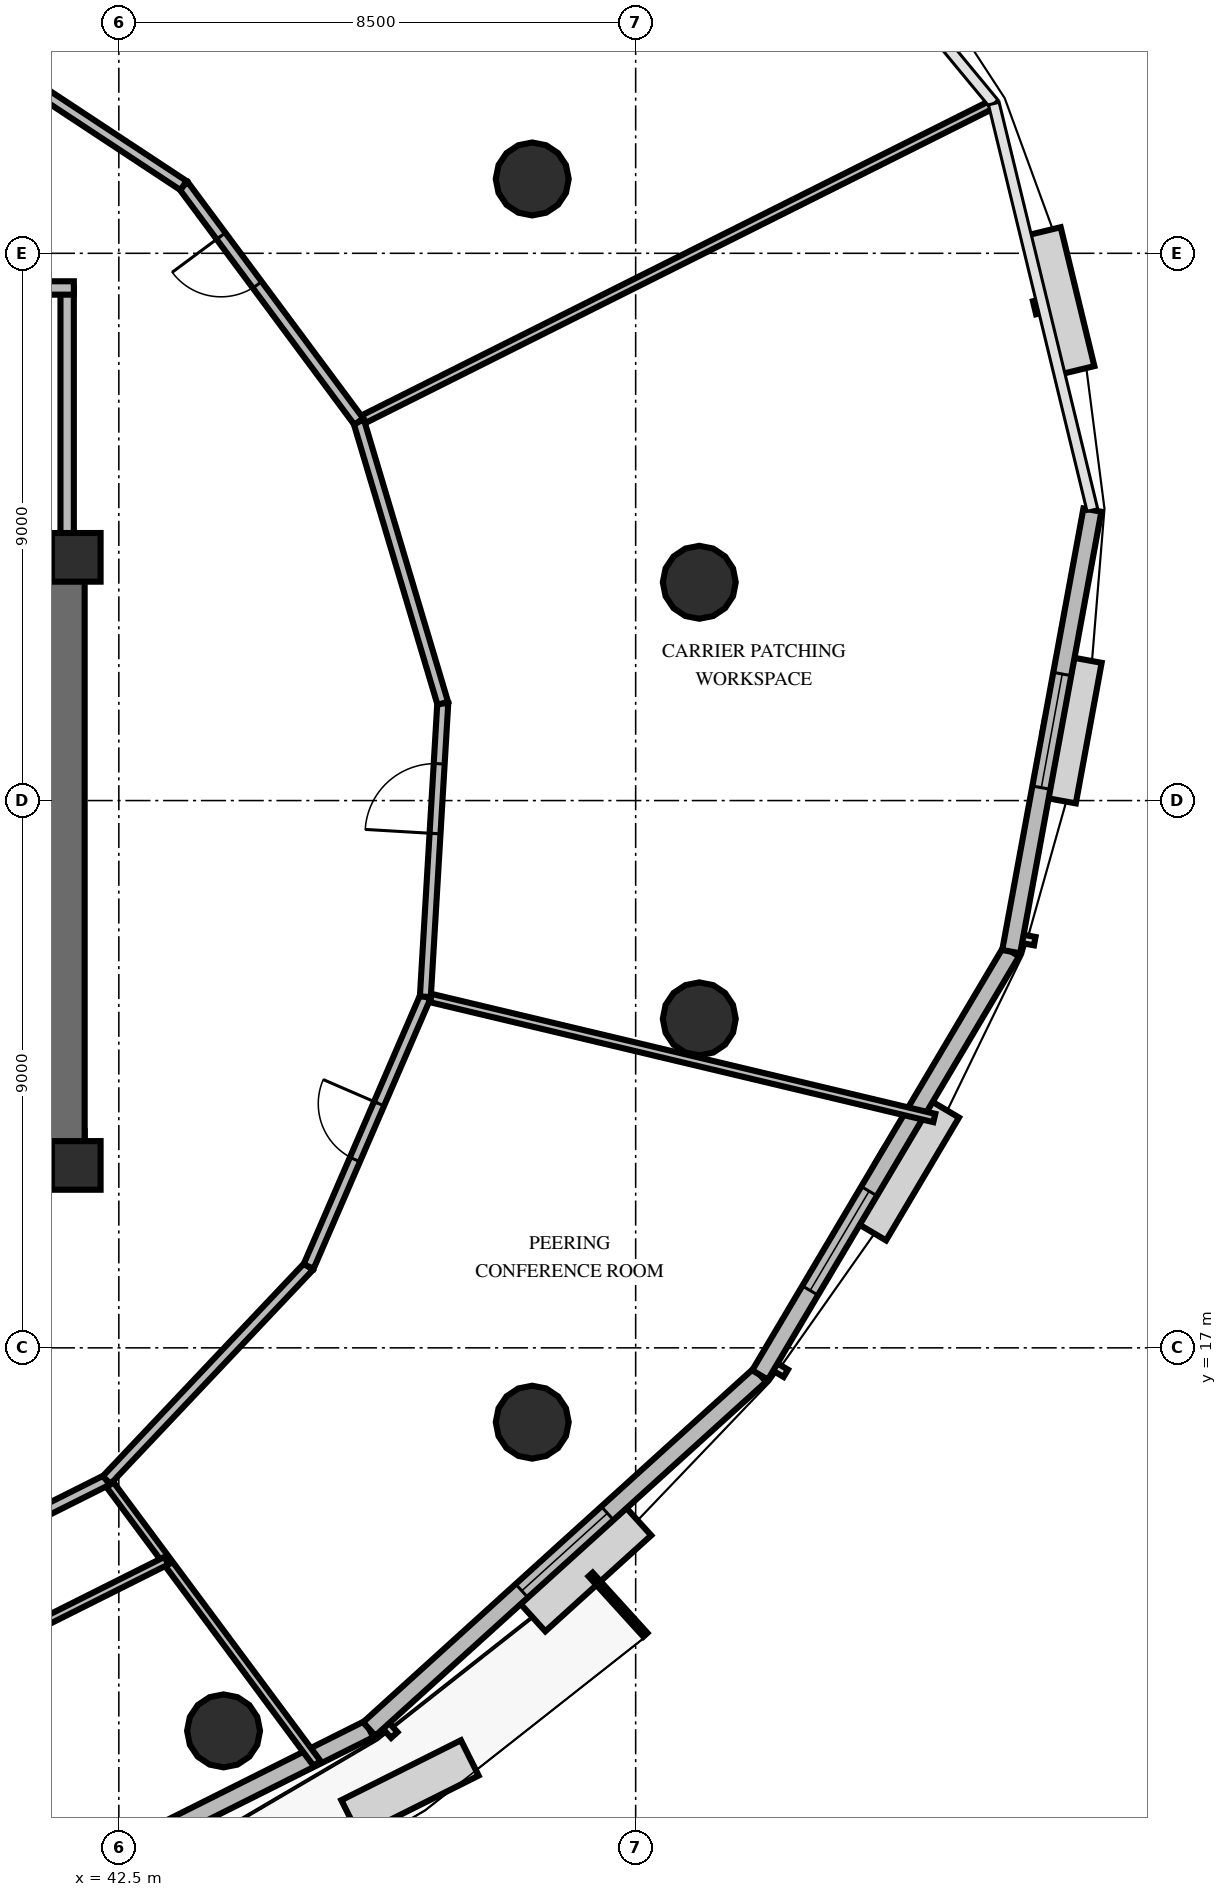
"""IFC4 building model, lengths in metres.
Left out: names, types, materials, properties, quantities, classifications, styles, units other than length and angle.
Written with IfcOpenShell. Run it as: python <this file> out.ifc"""

import sys

from ifc_helpers import new_model, si_unit, direction, frame, frame_2d, origin, origin_2d, place, context, subcontext, project, spatial, rectangle, circle, extrude, element, fill, save


model = new_model("IFC4")
c1 = context("Model", 3, precision=1e-05, world=origin(), true_north=direction((0.0, 1.0)))
c2 = subcontext(c1, "Body", "Model", "MODEL_VIEW")
j1 = project(units=[si_unit("LENGTHUNIT", "METRE"), si_unit("PLANEANGLEUNIT", "RADIAN")], contexts=[c1])
p1 = place(None, origin())
s1 = spatial("IfcSite", under=j1, at=p1, CompositionType="ELEMENT")
p2 = place(p1, origin())
s2 = spatial("IfcBuilding", under=s1, at=p2, CompositionType="ELEMENT")
p3 = place(p2, frame((0.0, 0.0, 145.8)))
s3 = spatial("IfcBuildingStorey", under=s2, at=p3, CompositionType="ELEMENT", Elevation=145.8)
p4 = place(p3, frame((26.072, 20.187, 0.0), z_axis=(0.0, 0.0, 1.0), x_axis=(1.0, 0.0, 0.0)))
e1 = element("IfcWall", 1, at=p4, inside=s3, PredefinedType="SHEAR", context=c2, shape_type="SweptSolid", body=[
    extrude(rectangle(XDim=15.866, YDim=0.75, at=frame_2d((7.933, 0.0))), origin(), (0.0, 0.0, 1.0), 4.0),
])
p5 = place(p3, frame((26.072, 30.013, 0.0), z_axis=(0.0, 0.0, 1.0), x_axis=(1.0, 0.0, 0.0)))
e2 = element("IfcWall", 2, at=p5, inside=s3, PredefinedType="SHEAR", context=c2, shape_type="SweptSolid", body=[
    extrude(rectangle(XDim=15.866, YDim=0.75, at=frame_2d((7.933, 0.0))), origin(), (0.0, 0.0, 1.0), 4.0),
])
p6 = place(p5, frame((0.878, 0.0, 0.0)))
e3 = element("IfcOpeningElement", 3, at=p6, cuts=e2, PredefinedType="OPENING", context=c2, shape_type="SweptSolid", body=[
    extrude(rectangle(XDim=1.05, YDim=2.15, at=frame_2d((0.525, 1.075))), frame((0.0, 0.385, 0.0), z_axis=(0.0, -1.0, 0.0), x_axis=(1.0, 0.0, 0.0)), (0.0, 0.0, 1.0), 0.77),
])
p7 = place(p5, frame((13.928, 0.0, 0.0)))
e4 = element("IfcOpeningElement", 4, at=p7, cuts=e2, PredefinedType="OPENING", context=c2, shape_type="SweptSolid", body=[
    extrude(rectangle(XDim=1.05, YDim=2.15, at=frame_2d((0.525, 1.075))), frame((0.0, 0.385, 0.0), z_axis=(0.0, -1.0, 0.0), x_axis=(1.0, 0.0, 0.0)), (0.0, 0.0, 1.0), 0.77),
])
p8 = place(p5, frame((7.378, 0.0, 0.0)))
e5 = element("IfcOpeningElement", 5, at=p8, cuts=e2, PredefinedType="OPENING", context=c2, shape_type="SweptSolid", body=[
    extrude(rectangle(XDim=1.1, YDim=2.15, at=frame_2d((0.55, 1.075))), frame((0.0, 0.385, 0.0), z_axis=(0.0, -1.0, 0.0), x_axis=(1.0, 0.0, 0.0)), (0.0, 0.0, 1.0), 0.77),
])
p9 = place(p3, frame((41.563, 19.812, 0.0), z_axis=(0.0, 0.0, 1.0), x_axis=(0.0, 1.0, 0.0)))
e6 = element("IfcWall", 6, at=p9, inside=s3, PredefinedType="SHEAR", context=c2, shape_type="SweptSolid", body=[
    extrude(rectangle(XDim=10.576, YDim=0.75, at=frame_2d((5.288, 0.0))), origin(), (0.0, 0.0, 1.0), 4.0),
])
for number, where, z_axis, x_axis in (
    (7, (41.8, 20.0, 0.0), (0.0, 0.0, 1.0), (1.0, 0.0, 0.0)),
    (8, (41.8, 30.0, 0.0), (0.0, 0.0, 1.0), (1.0, 0.0, 0.0)),
):
    element("IfcColumn", number, at=place(p3, frame(where, z_axis=z_axis, x_axis=x_axis)), inside=s3, PredefinedType="PILASTER", context=c2, shape_type="SweptSolid", body=[
        extrude(rectangle(XDim=0.8, YDim=0.8, at=origin_2d()), origin(), (0.0, 0.0, 1.0), 4.0),
    ])
for number, where, z_axis, x_axis in (
    (9, (52.046, 29.59, 0.0), (0.0, 0.0, 1.0), (1.0, 0.0, 0.0)),
    (10, (49.299, 36.222, 0.0), (0.0, 0.0, 1.0), (1.0, 0.0, 0.0)),
    (11, (44.222, 10.701, 0.0), (0.0, 0.0, 1.0), (1.0, 0.0, 0.0)),
    (12, (49.299, 15.778, 0.0), (0.0, 0.0, 1.0), (1.0, 0.0, 0.0)),
    (13, (52.046, 22.41, 0.0), (0.0, 0.0, 1.0), (1.0, 0.0, 0.0)),
):
    element("IfcColumn", number, at=place(p3, frame(where, z_axis=z_axis, x_axis=x_axis)), inside=s3, PredefinedType="COLUMN", context=c2, shape_type="SweptSolid", body=[
        extrude(circle(Radius=0.6, at=origin_2d()), origin(), (0.0, 0.0, 1.0), 4.0),
    ])
p10 = place(p3, frame((38.668, 6.75, 0.0), z_axis=(0.0, 0.0, 1.0), x_axis=(0.894163416392, 0.447740756227, 0.0)))
e14 = element("IfcWall", 14, at=p10, inside=s3, PredefinedType="SOLIDWALL", context=c2, shape_type="SweptSolid", body=[
    extrude(rectangle(XDim=8.891, YDim=0.3, at=frame_2d((4.445, 0.0))), origin(), (0.0, 0.0, 1.0), 2.9),
])
p11 = place(p10, frame((2.51, 0.0, 0.0)))
e15 = element("IfcOpeningElement", 15, at=p11, cuts=e14, PredefinedType="OPENING", context=c2, shape_type="SweptSolid", body=[
    extrude(rectangle(XDim=1.05, YDim=2.15, at=frame_2d((0.525, 1.075))), frame((0.0, 0.16, 0.0), z_axis=(0.0, -1.0, 0.0), x_axis=(1.0, 0.0, 0.0)), (0.0, 0.0, 1.0), 0.32),
])
p12 = place(p3, frame((46.618, 10.731, 0.0), z_axis=(0.0, 0.0, 1.0), x_axis=(0.741123503334, 0.671368715987, 0.0)))
e16 = element("IfcWall", 16, at=p12, inside=s3, PredefinedType="SOLIDWALL", context=c2, shape_type="SweptSolid", body=[
    extrude(rectangle(XDim=8.673, YDim=0.3, at=frame_2d((4.336, 0.0))), origin(), (0.0, 0.0, 1.0), 2.9),
])
p13 = place(p12, frame((3.386, 0.0, 0.8)))
e17 = element("IfcOpeningElement", 17, at=p13, cuts=e16, PredefinedType="OPENING", context=c2, shape_type="SweptSolid", body=[
    extrude(rectangle(XDim=1.9, YDim=1.95, at=frame_2d((0.95, 0.975))), frame((0.0, 0.16, 0.0), z_axis=(0.0, -1.0, 0.0), x_axis=(1.0, 0.0, 0.0)), (0.0, 0.0, 1.0), 0.32),
])
p14 = place(p3, frame((53.045, 16.554, 0.0), z_axis=(0.0, 0.0, 1.0), x_axis=(0.510285094065, 0.860005303922, 0.0)))
e18 = element("IfcWall", 18, at=p14, inside=s3, PredefinedType="SOLIDWALL", context=c2, shape_type="SweptSolid", body=[
    extrude(rectangle(XDim=8.095, YDim=0.3, at=frame_2d((4.048, 0.0))), origin(), (0.0, 0.0, 1.0), 2.9),
])
p15 = place(p14, frame((1.615, 0.0, 0.8)))
e19 = element("IfcOpeningElement", 19, at=p15, cuts=e18, PredefinedType="OPENING", context=c2, shape_type="SweptSolid", body=[
    extrude(rectangle(XDim=1.9, YDim=1.95, at=frame_2d((0.95, 0.975))), frame((0.0, 0.16, 0.0), z_axis=(0.0, -1.0, 0.0), x_axis=(1.0, 0.0, 0.0)), (0.0, 0.0, 1.0), 0.32),
])
p16 = place(p3, frame((57.176, 23.516, 0.0), z_axis=(0.0, 0.0, 1.0), x_axis=(0.180843444068, 0.983511895575, 0.0)))
e20 = element("IfcWall", 20, at=p16, inside=s3, PredefinedType="SOLIDWALL", context=c2, shape_type="SweptSolid", body=[
    extrude(rectangle(XDim=7.383, YDim=0.3, at=frame_2d((3.692, 0.0))), origin(), (0.0, 0.0, 1.0), 2.9),
])
p17 = place(p16, frame((2.742, 0.0, 0.8)))
e21 = element("IfcOpeningElement", 21, at=p17, cuts=e20, PredefinedType="OPENING", context=c2, shape_type="SweptSolid", body=[
    extrude(rectangle(XDim=1.9, YDim=1.95, at=frame_2d((0.95, 0.975))), frame((0.0, 0.16, 0.0), z_axis=(0.0, -1.0, 0.0), x_axis=(1.0, 0.0, 0.0)), (0.0, 0.0, 1.0), 0.32),
])
p18 = place(p3, frame((41.65, 30.05, 0.0), z_axis=(0.0, 0.0, 1.0), x_axis=(0.0, 1.0, 0.0)))
e22 = element("IfcWall", 22, at=p18, inside=s3, PredefinedType="SOLIDWALL", context=c2, shape_type="SweptSolid", body=[
    extrude(rectangle(XDim=4.38, YDim=0.22, at=frame_2d((2.19, 0.0))), origin(), (0.0, 0.0, 1.0), 2.8),
])
p19 = place(p3, frame((37.45, 34.43, 0.0), z_axis=(0.0, 0.0, 1.0), x_axis=(1.0, 0.0, 0.0)))
e23 = element("IfcWall", 23, at=p19, inside=s3, PredefinedType="SOLIDWALL", context=c2, shape_type="SweptSolid", body=[
    extrude(rectangle(XDim=4.31, YDim=0.22, at=frame_2d((2.155, 0.0))), origin(), (0.0, 0.0, 1.0), 2.8),
])
p20 = place(p19, frame((1.6, 0.0, 0.0)))
e24 = element("IfcOpeningElement", 24, at=p20, cuts=e23, PredefinedType="OPENING", context=c2, shape_type="SweptSolid", body=[
    extrude(rectangle(XDim=1.1, YDim=2.15, at=frame_2d((0.55, 1.075))), frame((0.0, 0.12, 0.0), z_axis=(0.0, -1.0, 0.0), x_axis=(1.0, 0.0, 0.0)), (0.0, 0.0, 1.0), 0.24),
])
p21 = place(p3, frame((42.3, 14.825, 0.0), z_axis=(0.0, 0.0, 1.0), x_axis=(0.596217105749, -0.802823245062, 0.0)))
e25 = element("IfcWall", 25, at=p21, inside=s3, PredefinedType="PARTITIONING", context=c2, shape_type="SweptSolid", body=[
    extrude(rectangle(XDim=5.803, YDim=0.14, at=frame_2d((2.902, 0.0))), origin(), (0.0, 0.0, 1.0), 2.8),
])
p22 = place(p3, frame((37.977, 12.66, 0.0), z_axis=(0.0, 0.0, 1.0), x_axis=(0.894164433442, 0.447738725115, 0.0)))
e26 = element("IfcWall", 26, at=p22, inside=s3, PredefinedType="PARTITIONING", context=c2, shape_type="SweptSolid", body=[
    extrude(rectangle(XDim=4.834, YDim=0.18, at=frame_2d((2.417, 0.0))), origin(), (0.0, 0.0, 1.0), 2.8),
])
p23 = place(p22, frame((1.034, 0.0, 0.0)))
e27 = element("IfcOpeningElement", 27, at=p23, cuts=e26, PredefinedType="OPENING", context=c2, shape_type="SweptSolid", body=[
    extrude(rectangle(XDim=1.0, YDim=2.15, at=frame_2d((0.5, 1.075))), frame((0.0, 0.1, 0.0), z_axis=(0.0, -1.0, 0.0), x_axis=(1.0, 0.0, 0.0)), (0.0, 0.0, 1.0), 0.2),
])
p24 = place(p3, frame((38.448, 11.079, 0.0), z_axis=(0.0, 0.0, 1.0), x_axis=(0.894156125226, 0.447755316798, 0.0)))
e28 = element("IfcWall", 28, at=p24, inside=s3, PredefinedType="PARTITIONING", context=c2, shape_type="SweptSolid", body=[
    extrude(rectangle(XDim=5.407, YDim=0.14, at=frame_2d((2.704, 0.0))), origin(), (0.0, 0.0, 1.0), 2.8),
])
p25 = place(p24, frame((1.204, 0.0, 0.0)))
e29 = element("IfcOpeningElement", 29, at=p25, cuts=e28, PredefinedType="OPENING", context=c2, shape_type="SweptSolid", body=[
    extrude(rectangle(XDim=0.95, YDim=2.15, at=frame_2d((0.475, 1.075))), frame((0.0, 0.08, 0.0), z_axis=(0.0, -1.0, 0.0), x_axis=(1.0, 0.0, 0.0)), (0.0, 0.0, 1.0), 0.16),
])
p26 = place(p3, frame((47.541, 22.774, 0.0), z_axis=(0.0, 0.0, 1.0), x_axis=(0.972769976453, -0.231772675076, 0.0)))
e30 = element("IfcWall", 30, at=p26, inside=s3, PredefinedType="PARTITIONING", context=c2, shape_type="SweptSolid", body=[
    extrude(rectangle(XDim=8.605, YDim=0.14, at=frame_2d((4.302, 0.0))), origin(), (0.0, 0.0, 1.0), 2.8),
])
p27 = place(p3, frame((42.3, 14.825, 0.0), z_axis=(0.0, 0.0, 1.0), x_axis=(0.687059377982, 0.726601273827, 0.0)))
e31 = element("IfcWall", 31, at=p27, inside=s3, PredefinedType="PARTITIONING", context=c2, shape_type="SweptSolid", body=[
    extrude(rectangle(XDim=4.834, YDim=0.18, at=frame_2d((2.417, 0.0))), origin(), (0.0, 0.0, 1.0), 2.8),
])
p28 = place(p3, frame((45.621, 18.337, 0.0), z_axis=(0.0, 0.0, 1.0), x_axis=(0.397141112734, 0.917757558714, 0.0)))
e32 = element("IfcWall", 32, at=p28, inside=s3, PredefinedType="PARTITIONING", context=c2, shape_type="SweptSolid", body=[
    extrude(rectangle(XDim=4.834, YDim=0.18, at=frame_2d((2.417, 0.0))), origin(), (0.0, 0.0, 1.0), 2.8),
])
p29 = place(p28, frame((1.917, 0.0, 0.0)))
e33 = element("IfcOpeningElement", 33, at=p29, cuts=e32, PredefinedType="OPENING", context=c2, shape_type="SweptSolid", body=[
    extrude(rectangle(XDim=1.0, YDim=2.15, at=frame_2d((0.5, 1.075))), frame((0.0, 0.1, 0.0), z_axis=(0.0, -1.0, 0.0), x_axis=(1.0, 0.0, 0.0)), (0.0, 0.0, 1.0), 0.2),
])
p30 = place(p3, frame((46.447, 32.233, 0.0), z_axis=(0.0, 0.0, 1.0), x_axis=(0.894159481229, 0.447748614882, 0.0)))
e34 = element("IfcWall", 34, at=p30, inside=s3, PredefinedType="PARTITIONING", context=c2, shape_type="SweptSolid", body=[
    extrude(rectangle(XDim=11.68, YDim=0.14, at=frame_2d((5.84, 0.0))), origin(), (0.0, 0.0, 1.0), 2.8),
])
p31 = place(p3, frame((47.541, 22.774, 0.0), z_axis=(0.0, 0.0, 1.0), x_axis=(0.059290431537, 0.998240774928, 0.0)))
e35 = element("IfcWall", 35, at=p31, inside=s3, PredefinedType="PARTITIONING", context=c2, shape_type="SweptSolid", body=[
    extrude(rectangle(XDim=4.834, YDim=0.18, at=frame_2d((2.417, 0.0))), origin(), (0.0, 0.0, 1.0), 2.8),
])
p32 = place(p31, frame((2.688, 0.0, 0.0)))
e36 = element("IfcOpeningElement", 36, at=p32, cuts=e35, PredefinedType="OPENING", context=c2, shape_type="SweptSolid", body=[
    extrude(rectangle(XDim=1.15, YDim=2.15, at=frame_2d((0.575, 1.075))), frame((0.0, 0.1, 0.0), z_axis=(0.0, -1.0, 0.0), x_axis=(1.0, 0.0, 0.0)), (0.0, 0.0, 1.0), 0.2),
])
p33 = place(p3, frame((47.828, 27.6, 0.0), z_axis=(0.0, 0.0, 1.0), x_axis=(-0.285674945377, 0.958326575643, 0.0)))
e37 = element("IfcWall", 37, at=p33, inside=s3, PredefinedType="PARTITIONING", context=c2, shape_type="SweptSolid", body=[
    extrude(rectangle(XDim=4.834, YDim=0.18, at=frame_2d((2.417, 0.0))), origin(), (0.0, 0.0, 1.0), 2.8),
])
p34 = place(p3, frame((46.447, 32.233, 0.0), z_axis=(0.0, 0.0, 1.0), x_axis=(-0.596219858709, 0.802821200568, 0.0)))
e38 = element("IfcWall", 38, at=p34, inside=s3, PredefinedType="PARTITIONING", context=c2, shape_type="SweptSolid", body=[
    extrude(rectangle(XDim=4.834, YDim=0.18, at=frame_2d((2.417, 0.0))), origin(), (0.0, 0.0, 1.0), 2.8),
])
p35 = place(p34, frame((2.801, 0.0, 0.0)))
e39 = element("IfcOpeningElement", 39, at=p35, cuts=e38, PredefinedType="OPENING", context=c2, shape_type="SweptSolid", body=[
    extrude(rectangle(XDim=1.0, YDim=2.15, at=frame_2d((0.5, 1.075))), frame((0.0, 0.1, 0.0), z_axis=(0.0, -1.0, 0.0), x_axis=(1.0, 0.0, 0.0)), (0.0, 0.0, 1.0), 0.2),
])
p36 = place(p3, frame((43.564, 36.114, 0.0), z_axis=(0.0, 0.0, 1.0), x_axis=(-0.834852183568, 0.550474187943, 0.0)))
e40 = element("IfcWall", 40, at=p36, inside=s3, PredefinedType="PARTITIONING", context=c2, shape_type="SweptSolid", body=[
    extrude(rectangle(XDim=4.834, YDim=0.18, at=frame_2d((2.417, 0.0))), origin(), (0.0, 0.0, 1.0), 2.8),
])
p37 = place(p13, origin())
e41 = element("IfcWindow", 41, at=p37, inside=s3, PartitioningType="SINGLE_PANEL", PredefinedType="WINDOW", context=c2, shape_type="SweptSolid", body=[
    extrude(rectangle(XDim=1.9, YDim=1.95, at=frame_2d((0.95, 0.975))), frame((0.0, 0.03, 0.0), z_axis=(0.0, -1.0, 0.0), x_axis=(1.0, 0.0, 0.0)), (0.0, 0.0, 1.0), 0.06),
])
fill(e17, e41)
p38 = place(p15, origin())
e42 = element("IfcWindow", 42, at=p38, inside=s3, PartitioningType="SINGLE_PANEL", PredefinedType="WINDOW", context=c2, shape_type="SweptSolid", body=[
    extrude(rectangle(XDim=1.9, YDim=1.95, at=frame_2d((0.95, 0.975))), frame((0.0, 0.03, 0.0), z_axis=(0.0, -1.0, 0.0), x_axis=(1.0, 0.0, 0.0)), (0.0, 0.0, 1.0), 0.06),
])
fill(e19, e42)
p39 = place(p17, origin())
e43 = element("IfcWindow", 43, at=p39, inside=s3, PartitioningType="SINGLE_PANEL", PredefinedType="WINDOW", context=c2, shape_type="SweptSolid", body=[
    extrude(rectangle(XDim=1.9, YDim=1.95, at=frame_2d((0.95, 0.975))), frame((0.0, 0.03, 0.0), z_axis=(0.0, -1.0, 0.0), x_axis=(1.0, 0.0, 0.0)), (0.0, 0.0, 1.0), 0.06),
])
fill(e21, e43)
p40 = place(p29, origin())
e44 = element("IfcDoor", 44, at=p40, inside=s3, OperationType="SINGLE_SWING_RIGHT", PredefinedType="DOOR", context=c2, shape_type="SweptSolid", body=[
    extrude(rectangle(XDim=1.0, YDim=2.15, at=frame_2d((0.5, 1.075))), frame((0.0, 0.025, 0.0), z_axis=(0.0, -1.0, 0.0), x_axis=(1.0, 0.0, 0.0)), (0.0, 0.0, 1.0), 0.05),
])
fill(e33, e44)
p41 = place(p32, origin())
e45 = element("IfcDoor", 45, at=p41, inside=s3, OperationType="SINGLE_SWING_LEFT", PredefinedType="DOOR", context=c2, shape_type="SweptSolid", body=[
    extrude(rectangle(XDim=1.15, YDim=2.15, at=frame_2d((0.575, 1.075))), frame((0.0, 0.025, 0.0), z_axis=(0.0, -1.0, 0.0), x_axis=(1.0, 0.0, 0.0)), (0.0, 0.0, 1.0), 0.05),
])
fill(e36, e45)
p42 = place(p35, origin())
e46 = element("IfcDoor", 46, at=p42, inside=s3, OperationType="SINGLE_SWING_RIGHT", PredefinedType="DOOR", context=c2, shape_type="SweptSolid", body=[
    extrude(rectangle(XDim=1.0, YDim=2.15, at=frame_2d((0.5, 1.075))), frame((0.0, 0.025, 0.0), z_axis=(0.0, -1.0, 0.0), x_axis=(1.0, 0.0, 0.0)), (0.0, 0.0, 1.0), 0.05),
])
fill(e39, e46)
save(model, sys.argv[1])
